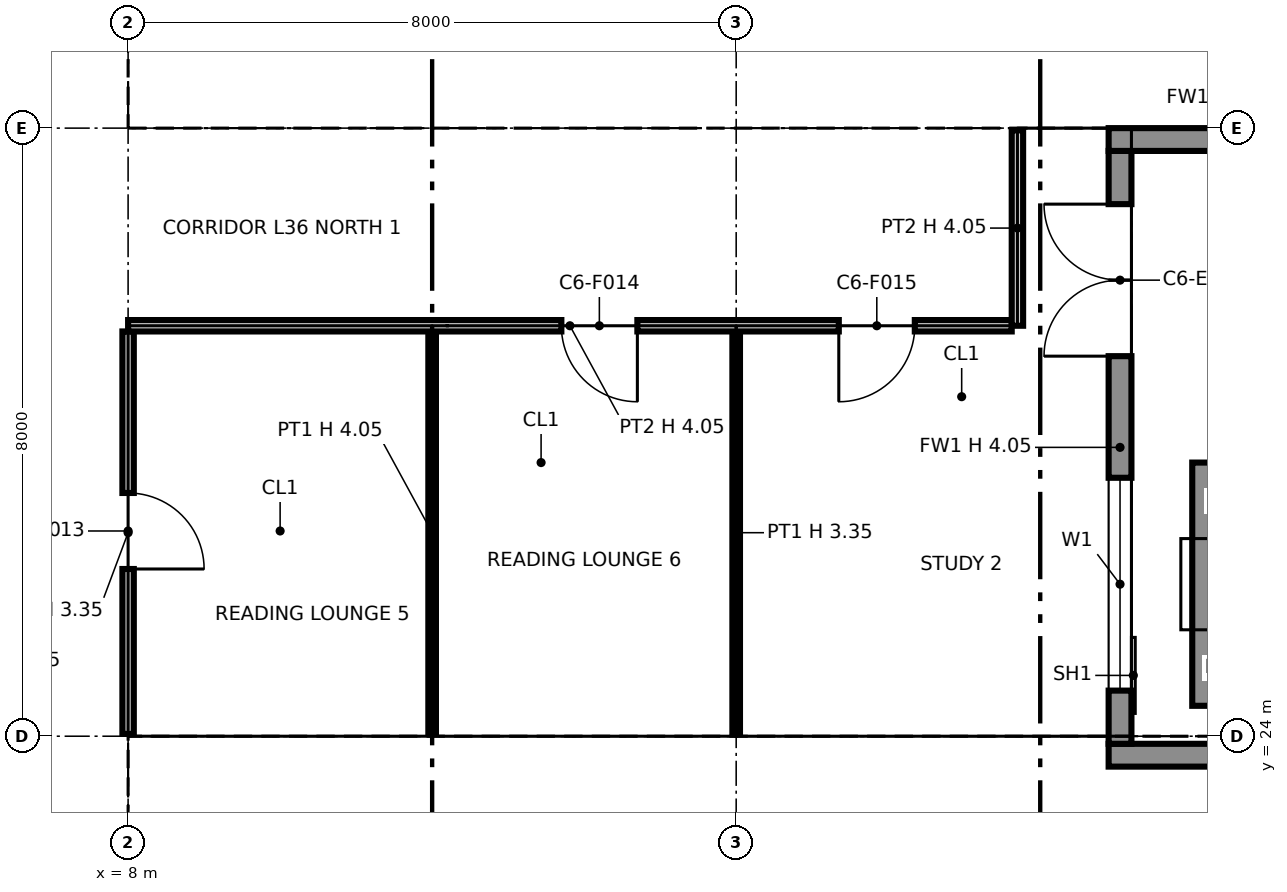
"""IFC4 building model, lengths in metres.
Left out: names, types, materials, properties, quantities, classifications, styles, units other than length and angle.
Written with IfcOpenShell. Run it as: python <this file> out.ifc"""

import sys

from ifc_helpers import new_model, si_unit, direction, frame, frame_2d, origin, origin_2d, place, context, subcontext, project, spatial, polyline, rectangle, i_section, outline, extrude, element, fill, save


model = new_model("IFC4")
c1 = context("Model", 3, precision=1e-05, world=origin(), true_north=direction((0.0, 1.0)))
c2 = subcontext(c1, "Body", "Model", "MODEL_VIEW")
j1 = project(units=[si_unit("LENGTHUNIT", "METRE"), si_unit("PLANEANGLEUNIT", "RADIAN")], contexts=[c1])
p1 = place(None, origin())
s1 = spatial("IfcSite", under=j1, at=p1, CompositionType="ELEMENT")
p2 = place(p1, origin())
s2 = spatial("IfcBuilding", under=s1, at=p2, CompositionType="ELEMENT")
p3 = place(p2, frame((0.0, 0.0, 174.6)))
s3 = spatial("IfcBuildingStorey", under=s2, at=p3, CompositionType="ELEMENT", Elevation=174.6)
p4 = place(p3, frame((8.0, 24.0, 0.0), z_axis=(0.0, 0.0, 1.0), x_axis=(1.0, 0.0, 0.0)))
e1 = element("IfcColumn", 1, at=p4, inside=s3, PredefinedType="COLUMN", context=c2, shape_type="SweptSolid", body=[
    extrude(i_section(OverallWidth=0.401, OverallDepth=0.399, WebThickness=0.025, FlangeThickness=0.04, at=origin_2d()), origin(), (0.0, 0.0, 1.0), 4.05),
])
p5 = place(p3, frame((8.0, 32.0, 0.0), z_axis=(0.0, 0.0, 1.0), x_axis=(1.0, 0.0, 0.0)))
e2 = element("IfcColumn", 2, at=p5, inside=s3, PredefinedType="COLUMN", context=c2, shape_type="SweptSolid", body=[
    extrude(i_section(OverallWidth=0.257, OverallDepth=0.363, WebThickness=0.013, FlangeThickness=0.022, at=origin_2d()), origin(), (0.0, 0.0, 1.0), 4.05),
])
p6 = place(p3, frame((16.0, 24.0, 0.0), z_axis=(0.0, 0.0, 1.0), x_axis=(1.0, 0.0, 0.0)))
e3 = element("IfcColumn", 3, at=p6, inside=s3, PredefinedType="COLUMN", context=c2, shape_type="SweptSolid", body=[
    extrude(i_section(OverallWidth=0.401, OverallDepth=0.399, WebThickness=0.025, FlangeThickness=0.04, at=origin_2d()), origin(), (0.0, 0.0, 1.0), 4.05),
])
p7 = place(p3, frame((16.0, 32.0, 0.0), z_axis=(0.0, 0.0, 1.0), x_axis=(1.0, 0.0, 0.0)))
e4 = element("IfcColumn", 4, at=p7, inside=s3, PredefinedType="COLUMN", context=c2, shape_type="SweptSolid", body=[
    extrude(i_section(OverallWidth=0.257, OverallDepth=0.363, WebThickness=0.013, FlangeThickness=0.022, at=origin_2d()), origin(), (0.0, 0.0, 1.0), 4.05),
])
p8 = place(p3, frame((32.0, 23.75, 0.0), z_axis=(0.0, 0.0, 1.0), x_axis=(-1.0, 0.0, 0.0)))
e5 = element("IfcWall", 5, at=p8, inside=s3, PredefinedType="SOLIDWALL", context=c2, shape_type="SweptSolid", body=[
    extrude(rectangle(XDim=11.1, YDim=0.3, at=frame_2d((5.55, 0.0))), origin(), (0.0, 0.0, 1.0), 4.05),
])
p9 = place(p3, frame((21.05, 23.9, 0.0), z_axis=(0.0, 0.0, 1.0), x_axis=(0.0, 1.0, 0.0)))
e6 = element("IfcWall", 6, at=p9, inside=s3, PredefinedType="SOLIDWALL", context=c2, shape_type="SweptSolid", body=[
    extrude(rectangle(XDim=7.8, YDim=0.3, at=frame_2d((3.9, 0.0))), origin(), (0.0, 0.0, 1.0), 4.05),
])
p10 = place(p9, frame((0.7, 0.0, 0.9)))
e7 = element("IfcOpeningElement", 7, at=p10, cuts=e6, PredefinedType="OPENING", context=c2, shape_type="SweptSolid", body=[
    extrude(rectangle(XDim=2.8, YDim=2.2, at=frame_2d((1.4, 1.1))), frame((0.0, 0.16, 0.0), z_axis=(0.0, -1.0, 0.0), x_axis=(1.0, 0.0, 0.0)), (0.0, 0.0, 1.0), 0.32),
])
p11 = place(p9, frame((5.1, 0.0, 0.0)))
e8 = element("IfcOpeningElement", 8, at=p11, cuts=e6, PredefinedType="OPENING", context=c2, shape_type="SweptSolid", body=[
    extrude(rectangle(XDim=2.0, YDim=2.4, at=frame_2d((1.0, 1.2))), frame((0.0, 0.16, 0.0), z_axis=(0.0, -1.0, 0.0), x_axis=(1.0, 0.0, 0.0)), (0.0, 0.0, 1.0), 0.32),
])
p12 = place(p3, frame((23.9, 31.85, 0.0), z_axis=(0.0, 0.0, 1.0), x_axis=(-1.0, 0.0, 0.0)))
e9 = element("IfcWall", 9, at=p12, inside=s3, PredefinedType="SOLIDWALL", context=c2, shape_type="SweptSolid", body=[
    extrude(rectangle(XDim=3.0, YDim=0.3, at=frame_2d((1.5, 0.0))), origin(), (0.0, 0.0, 1.0), 3.437),
])
p13 = place(p3, frame((22.45, 24.4, 0.0), z_axis=(0.0, 0.0, 1.0), x_axis=(0.0, 1.0, 0.0)))
e10 = element("IfcWall", 10, at=p13, inside=s3, PredefinedType="SOLIDWALL", context=c2, shape_type="SweptSolid", body=[
    extrude(rectangle(XDim=3.2, YDim=0.9, at=frame_2d((1.6, 0.0))), origin(), (0.0, 0.0, 1.0), 0.6),
])
p14 = place(p3, frame((8.75, 8.85, 0.0), z_axis=(0.0, 0.0, 1.0), x_axis=(0.0, 1.0, 0.0)))
e11 = element("IfcWall", 11, at=p14, inside=s3, PredefinedType="PARTITIONING", context=c2, shape_type="SweptSolid", body=[
    extrude(outline(polyline([(0.0, 0.0), (14.3, 0.0), (14.3, 4.05), (11.231, 4.05), (11.23, 3.589), (11.07, 3.589), (11.069, 4.05), (7.269, 4.05), (7.268, 3.442), (7.032, 3.442), (7.031, 4.05), (0.0, 4.05), (0.0, 0.0)])), frame((0.0, 0.1, 0.0), z_axis=(0.0, -1.0, 0.0), x_axis=(1.0, 0.0, 0.0)), (0.0, 0.0, 1.0), 0.2),
])
p15 = place(p14, frame((8.3, 0.0, 0.0)))
e12 = element("IfcOpeningElement", 12, at=p15, cuts=e11, PredefinedType="OPENING", context=c2, shape_type="SweptSolid", body=[
    extrude(rectangle(XDim=1.8, YDim=2.1, at=frame_2d((0.9, 1.05))), frame((0.0, 0.11, 0.0), z_axis=(0.0, -1.0, 0.0), x_axis=(1.0, 0.0, 0.0)), (0.0, 0.0, 1.0), 0.22),
])
p16 = place(p3, frame((8.65, 23.25, 0.0), z_axis=(0.0, 0.0, 1.0), x_axis=(1.0, 0.0, 0.0)))
e13 = element("IfcWall", 13, at=p16, inside=s3, PredefinedType="PARTITIONING", context=c2, shape_type="SweptSolid", body=[
    extrude(outline(polyline([(0.0, 0.0), (14.7, 0.0), (14.7, 4.05), (7.469, 4.05), (7.468, 3.442), (7.232, 3.442), (7.231, 4.05), (0.0, 4.05), (0.0, 0.0)])), frame((0.0, 0.1, 0.0), z_axis=(0.0, -1.0, 0.0), x_axis=(1.0, 0.0, 0.0)), (0.0, 0.0, 1.0), 0.2),
])
for number, where, z_axis, x_axis in (
    (14, (14.425, 20.0, 0.0), (0.0, 0.0, 1.0), (0.0, 1.0, 0.0)),
    (15, (16.975, 20.0, 0.0), (0.0, 0.0, 1.0), (0.0, 1.0, 0.0)),
    (16, (19.525, 20.0, 0.0), (0.0, 0.0, 1.0), (0.0, 1.0, 0.0)),
    (17, (21.875, 20.0, 0.0), (0.0, 0.0, 1.0), (0.0, 1.0, 0.0)),
):
    element("IfcWall", number, at=place(p3, frame(where, z_axis=z_axis, x_axis=x_axis)), inside=s3, PredefinedType="PARTITIONING", context=c2, shape_type="SweptSolid", body=[
        extrude(outline(polyline([(0.0, 0.0), (3.15, 0.0), (3.15, 4.05), (0.082, 4.05), (0.081, 3.589), (0.0, 3.589), (0.0, 0.0)])), frame((0.0, 0.075, 0.0), z_axis=(0.0, -1.0, 0.0), x_axis=(1.0, 0.0, 0.0)), (0.0, 0.0, 1.0), 0.15),
    ])
p17 = place(p3, frame((8.65, 32.75, 0.0), z_axis=(0.0, 0.0, 1.0), x_axis=(1.0, 0.0, 0.0)))
e18 = element("IfcWall", 18, at=p17, inside=s3, PredefinedType="PARTITIONING", context=c2, shape_type="SweptSolid", body=[
    extrude(outline(polyline([(0.0, 0.0), (14.7, 0.0), (14.7, 4.05), (7.469, 4.05), (7.468, 3.442), (7.232, 3.442), (7.231, 4.05), (0.0, 4.05), (0.0, 0.0)])), frame((0.0, 0.1, 0.0), z_axis=(0.0, -1.0, 0.0), x_axis=(1.0, 0.0, 0.0)), (0.0, 0.0, 1.0), 0.2),
])
p18 = place(p17, frame((4.05, 0.0, 0.0)))
e19 = element("IfcOpeningElement", 19, at=p18, cuts=e18, PredefinedType="OPENING", context=c2, shape_type="SweptSolid", body=[
    extrude(rectangle(XDim=1.8, YDim=2.1, at=frame_2d((0.9, 1.05))), frame((0.0, 0.11, 0.0), z_axis=(0.0, -1.0, 0.0), x_axis=(1.0, 0.0, 0.0)), (0.0, 0.0, 1.0), 0.22),
])
p19 = place(p17, frame((8.35, 0.0, 0.0)))
e20 = element("IfcOpeningElement", 20, at=p19, cuts=e18, PredefinedType="OPENING", context=c2, shape_type="SweptSolid", body=[
    extrude(rectangle(XDim=1.4, YDim=2.1, at=frame_2d((0.7, 1.05))), frame((0.0, 0.11, 0.0), z_axis=(0.0, -1.0, 0.0), x_axis=(1.0, 0.0, 0.0)), (0.0, 0.0, 1.0), 0.22),
])
p20 = place(p17, frame((10.85, 0.0, 0.0)))
e21 = element("IfcOpeningElement", 21, at=p20, cuts=e18, PredefinedType="OPENING", context=c2, shape_type="SweptSolid", body=[
    extrude(rectangle(XDim=1.4, YDim=2.1, at=frame_2d((0.7, 1.05))), frame((0.0, 0.11, 0.0), z_axis=(0.0, -1.0, 0.0), x_axis=(1.0, 0.0, 0.0)), (0.0, 0.0, 1.0), 0.22),
])
p21 = place(p3, frame((8.75, 32.85, 0.0), z_axis=(0.0, 0.0, 1.0), x_axis=(0.0, 1.0, 0.0)))
e22 = element("IfcWall", 22, at=p21, inside=s3, PredefinedType="PARTITIONING", context=c2, shape_type="SweptSolid", body=[
    extrude(outline(polyline([(0.0, 0.0), (6.3, 0.0), (6.3, 4.05), (3.231, 4.05), (3.23, 3.589), (3.07, 3.589), (3.069, 4.05), (0.0, 4.05), (0.0, 0.0)])), frame((0.0, 0.1, 0.0), z_axis=(0.0, -1.0, 0.0), x_axis=(1.0, 0.0, 0.0)), (0.0, 0.0, 1.0), 0.2),
])
p22 = place(p3, frame((10.875, 32.85, 0.0), z_axis=(0.0, 0.0, 1.0), x_axis=(0.0, 1.0, 0.0)))
e23 = element("IfcWall", 23, at=p22, inside=s3, PredefinedType="PARTITIONING", context=c2, shape_type="SweptSolid", body=[
    extrude(rectangle(XDim=2.15, YDim=0.15, at=frame_2d((1.075, 0.0))), origin(), (0.0, 0.0, 1.0), 4.05),
])
p23 = place(p22, frame((0.6, 0.0, 0.0)))
e24 = element("IfcOpeningElement", 24, at=p23, cuts=e23, PredefinedType="OPENING", context=c2, shape_type="SweptSolid", body=[
    extrude(rectangle(XDim=0.9, YDim=2.1, at=frame_2d((0.45, 1.05))), frame((0.0, 0.085, 0.0), z_axis=(0.0, -1.0, 0.0), x_axis=(1.0, 0.0, 0.0)), (0.0, 0.0, 1.0), 0.17),
])
p24 = place(p3, frame((16.0, 32.85, 0.0), z_axis=(0.0, 0.0, 1.0), x_axis=(0.0, 1.0, 0.0)))
e25 = element("IfcWall", 25, at=p24, inside=s3, PredefinedType="PARTITIONING", context=c2, shape_type="SweptSolid", body=[
    extrude(rectangle(XDim=6.3, YDim=0.6, at=frame_2d((3.15, 0.0))), origin(), (0.0, 0.0, 1.0), 3.442),
])
p25 = place(p3, frame((19.2, 32.85, 0.0), z_axis=(0.0, 0.0, 1.0), x_axis=(0.0, 1.0, 0.0)))
e26 = element("IfcWall", 26, at=p25, inside=s3, PredefinedType="PARTITIONING", context=c2, shape_type="SweptSolid", body=[
    extrude(rectangle(XDim=6.3, YDim=0.2, at=frame_2d((3.15, 0.0))), origin(), (0.0, 0.0, 1.0), 4.05),
])
p26 = place(p3, frame((8.0, 24.03, 0.0), z_axis=(0.0, 0.0, 1.0), x_axis=(0.0, 1.0, 0.0)))
e27 = element("IfcWall", 27, at=p26, inside=s3, PredefinedType="PARTITIONING", context=c2, shape_type="SweptSolid", body=[
    extrude(rectangle(XDim=5.295, YDim=0.15, at=frame_2d((2.647, 0.0))), origin(), (0.0, 0.0, 1.0), 3.354),
])
p27 = place(p26, frame((3.17, 0.0, 0.0), z_axis=(0.0, 0.0, 1.0), x_axis=(-1.0, 0.0, 0.0)))
e28 = element("IfcOpeningElement", 28, at=p27, cuts=e27, PredefinedType="OPENING", context=c2, shape_type="SweptSolid", body=[
    extrude(rectangle(XDim=1.0, YDim=2.1, at=frame_2d((0.5, 1.05))), frame((0.0, 0.085, 0.0), z_axis=(0.0, -1.0, 0.0), x_axis=(1.0, 0.0, 0.0)), (0.0, 0.0, 1.0), 0.17),
])
p28 = place(p3, frame((12.0, 24.03, 0.0), z_axis=(0.0, 0.0, 1.0), x_axis=(0.0, 1.0, 0.0)))
e29 = element("IfcWall", 29, at=p28, inside=s3, PredefinedType="PARTITIONING", context=c2, shape_type="SweptSolid", body=[
    extrude(outline(polyline([(0.0, 0.0), (5.295, 0.0), (5.295, 4.05), (4.27, 4.05), (4.268, 3.354), (3.672, 3.354), (3.67, 4.05), (0.0, 4.05), (0.0, 0.0)])), frame((0.0, 0.05, 0.0), z_axis=(0.0, -1.0, 0.0), x_axis=(1.0, 0.0, 0.0)), (0.0, 0.0, 1.0), 0.1),
])
p29 = place(p3, frame((16.0, 24.03, 0.0), z_axis=(0.0, 0.0, 1.0), x_axis=(0.0, 1.0, 0.0)))
e30 = element("IfcWall", 30, at=p29, inside=s3, PredefinedType="PARTITIONING", context=c2, shape_type="SweptSolid", body=[
    extrude(rectangle(XDim=5.295, YDim=0.1, at=frame_2d((2.647, 0.0))), origin(), (0.0, 0.0, 1.0), 3.354),
])
p30 = place(p3, frame((8.0, 29.4, 0.0), z_axis=(0.0, 0.0, 1.0), x_axis=(1.0, 0.0, 0.0)))
e31 = element("IfcWall", 31, at=p30, inside=s3, PredefinedType="PARTITIONING", context=c2, shape_type="SweptSolid", body=[
    extrude(rectangle(XDim=11.625, YDim=0.15, at=frame_2d((5.812, 0.0))), origin(), (0.0, 0.0, 1.0), 4.05),
])
p31 = place(p30, frame((6.7, 0.0, 0.0), z_axis=(0.0, 0.0, 1.0), x_axis=(-1.0, 0.0, 0.0)))
e32 = element("IfcOpeningElement", 32, at=p31, cuts=e31, PredefinedType="OPENING", context=c2, shape_type="SweptSolid", body=[
    extrude(rectangle(XDim=1.0, YDim=2.1, at=frame_2d((0.5, 1.05))), frame((0.0, 0.085, 0.0), z_axis=(0.0, -1.0, 0.0), x_axis=(1.0, 0.0, 0.0)), (0.0, 0.0, 1.0), 0.17),
])
p32 = place(p30, frame((10.35, 0.0, 0.0), z_axis=(0.0, 0.0, 1.0), x_axis=(-1.0, 0.0, 0.0)))
e33 = element("IfcOpeningElement", 33, at=p32, cuts=e31, PredefinedType="OPENING", context=c2, shape_type="SweptSolid", body=[
    extrude(rectangle(XDim=1.0, YDim=2.1, at=frame_2d((0.5, 1.05))), frame((0.0, 0.085, 0.0), z_axis=(0.0, -1.0, 0.0), x_axis=(1.0, 0.0, 0.0)), (0.0, 0.0, 1.0), 0.17),
])
p33 = place(p3, frame((19.7, 29.4, 0.0), z_axis=(0.0, 0.0, 1.0), x_axis=(0.0, 1.0, 0.0)))
e34 = element("IfcWall", 34, at=p33, inside=s3, PredefinedType="PARTITIONING", context=c2, shape_type="SweptSolid", body=[
    extrude(rectangle(XDim=2.57, YDim=0.15, at=frame_2d((1.285, 0.0))), origin(), (0.0, 0.0, 1.0), 4.05),
])
p34 = place(p10, origin())
e35 = element("IfcWindow", 35, at=p34, inside=s3, PartitioningType="SINGLE_PANEL", PredefinedType="WINDOW", context=c2, shape_type="SweptSolid", body=[
    extrude(rectangle(XDim=2.8, YDim=2.2, at=frame_2d((1.4, 1.1))), frame((0.0, 0.03, 0.0), z_axis=(0.0, -1.0, 0.0), x_axis=(1.0, 0.0, 0.0)), (0.0, 0.0, 1.0), 0.06),
])
fill(e7, e35)
p35 = place(p11, origin())
e36 = element("IfcDoor", 36, at=p35, inside=s3, OperationType="DOUBLE_DOOR_SINGLE_SWING", PredefinedType="DOOR", context=c2, shape_type="SweptSolid", body=[
    extrude(rectangle(XDim=2.0, YDim=2.4, at=frame_2d((1.0, 1.2))), frame((0.0, 0.025, 0.0), z_axis=(0.0, -1.0, 0.0), x_axis=(1.0, 0.0, 0.0)), (0.0, 0.0, 1.0), 0.05),
])
fill(e8, e36)
p36 = place(p18, origin())
e37 = element("IfcDoor", 37, at=p36, inside=s3, OperationType="DOUBLE_DOOR_SINGLE_SWING", PredefinedType="NOTDEFINED", context=c2, shape_type="SweptSolid", body=[
    extrude(rectangle(XDim=1.8, YDim=2.1, at=frame_2d((0.9, 1.05))), frame((0.0, 0.025, 0.0), z_axis=(0.0, -1.0, 0.0), x_axis=(1.0, 0.0, 0.0)), (0.0, 0.0, 1.0), 0.05),
])
fill(e19, e37)
p37 = place(p19, origin())
e38 = element("IfcDoor", 38, at=p37, inside=s3, OperationType="DOUBLE_DOOR_SINGLE_SWING", PredefinedType="NOTDEFINED", context=c2, shape_type="SweptSolid", body=[
    extrude(rectangle(XDim=1.4, YDim=2.1, at=frame_2d((0.7, 1.05))), frame((0.0, 0.025, 0.0), z_axis=(0.0, -1.0, 0.0), x_axis=(1.0, 0.0, 0.0)), (0.0, 0.0, 1.0), 0.05),
])
fill(e20, e38)
p38 = place(p20, origin())
e39 = element("IfcDoor", 39, at=p38, inside=s3, OperationType="DOUBLE_DOOR_SINGLE_SWING", PredefinedType="NOTDEFINED", context=c2, shape_type="SweptSolid", body=[
    extrude(rectangle(XDim=1.4, YDim=2.1, at=frame_2d((0.7, 1.05))), frame((0.0, 0.025, 0.0), z_axis=(0.0, -1.0, 0.0), x_axis=(1.0, 0.0, 0.0)), (0.0, 0.0, 1.0), 0.05),
])
fill(e21, e39)
p39 = place(p27, origin())
e40 = element("IfcDoor", 40, at=p39, inside=s3, OperationType="SINGLE_SWING_RIGHT", PredefinedType="DOOR", context=c2, shape_type="SweptSolid", body=[
    extrude(rectangle(XDim=1.0, YDim=2.1, at=frame_2d((0.5, 1.05))), frame((0.0, 0.025, 0.0), z_axis=(0.0, -1.0, 0.0), x_axis=(1.0, 0.0, 0.0)), (0.0, 0.0, 1.0), 0.05),
])
fill(e28, e40)
p40 = place(p31, origin())
e41 = element("IfcDoor", 41, at=p40, inside=s3, OperationType="SINGLE_SWING_LEFT", PredefinedType="DOOR", context=c2, shape_type="SweptSolid", body=[
    extrude(rectangle(XDim=1.0, YDim=2.1, at=frame_2d((0.5, 1.05))), frame((0.0, 0.025, 0.0), z_axis=(0.0, -1.0, 0.0), x_axis=(1.0, 0.0, 0.0)), (0.0, 0.0, 1.0), 0.05),
])
fill(e32, e41)
p41 = place(p32, origin())
e42 = element("IfcDoor", 42, at=p41, inside=s3, OperationType="SINGLE_SWING_RIGHT", PredefinedType="DOOR", context=c2, shape_type="SweptSolid", body=[
    extrude(rectangle(XDim=1.0, YDim=2.1, at=frame_2d((0.5, 1.05))), frame((0.0, 0.025, 0.0), z_axis=(0.0, -1.0, 0.0), x_axis=(1.0, 0.0, 0.0)), (0.0, 0.0, 1.0), 0.05),
])
fill(e33, e42)
save(model, sys.argv[1])
